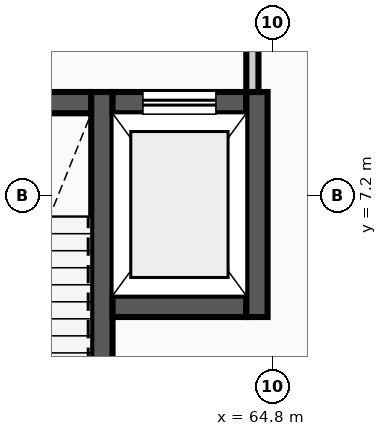
"""IFC4 building model, lengths in metres.
Left out: names, types, materials, properties, quantities, classifications, styles, units other than length and angle.
Written with IfcOpenShell. Run it as: python <this file> out.ifc"""

import sys

from ifc_helpers import new_model, si_unit, direction, frame, frame_2d, origin, place, context, subcontext, project, spatial, rectangle, extrude, element, fill, save


model = new_model("IFC4")
c1 = context("Model", 3, precision=1e-05, world=origin(), true_north=direction((0.0, 1.0)))
c2 = subcontext(c1, "Body", "Model", "MODEL_VIEW")
j1 = project(units=[si_unit("LENGTHUNIT", "METRE"), si_unit("PLANEANGLEUNIT", "RADIAN")], contexts=[c1])
p1 = place(None, origin())
s1 = spatial("IfcSite", under=j1, at=p1, CompositionType="ELEMENT")
p2 = place(p1, origin())
s2 = spatial("IfcBuilding", under=s1, at=p2, CompositionType="ELEMENT")
p3 = place(p2, frame((0.0, 0.0, 5.2)))
s3 = spatial("IfcBuildingStorey", under=s2, at=p3, CompositionType="ELEMENT", Elevation=5.2)
p4 = place(p3, frame((58.67, 8.725, 0.0), z_axis=(0.0, 0.0, 1.0), x_axis=(1.0, 0.0, 0.0)))
e1 = element("IfcWall", 1, at=p4, inside=s3, PredefinedType="SHEAR", context=c2, shape_type="SweptSolid", body=[
    extrude(rectangle(XDim=3.15, YDim=0.35, at=frame_2d((1.575, 0.0))), origin(), (0.0, 0.0, 1.0), 4.185),
])
p5 = place(p4, frame((1.025, 0.0, 0.0)))
e2 = element("IfcOpeningElement", 2, at=p5, cuts=e1, PredefinedType="OPENING", context=c2, shape_type="SweptSolid", body=[
    extrude(rectangle(XDim=1.1, YDim=2.15, at=frame_2d((0.55, 1.075))), frame((0.0, 0.185, 0.0), z_axis=(0.0, -1.0, 0.0), x_axis=(1.0, 0.0, 0.0)), (0.0, 0.0, 1.0), 0.37),
])
p6 = place(p3, frame((61.995, 0.4, 0.0), z_axis=(0.0, 0.0, 1.0), x_axis=(0.0, 1.0, 0.0)))
e3 = element("IfcWall", 3, at=p6, inside=s3, PredefinedType="SHEAR", context=c2, shape_type="SweptSolid", body=[
    extrude(rectangle(XDim=8.5, YDim=0.35, at=frame_2d((4.25, 0.0))), origin(), (0.0, 0.0, 1.0), 4.185),
])
p7 = place(p3, frame((62.17, 5.375, 0.0), z_axis=(0.0, 0.0, 1.0), x_axis=(1.0, 0.0, 0.0)))
e4 = element("IfcWall", 4, at=p7, inside=s3, PredefinedType="SHEAR", context=c2, shape_type="SweptSolid", body=[
    extrude(rectangle(XDim=2.2, YDim=0.35, at=frame_2d((1.1, 0.0))), origin(), (0.0, 0.0, 1.0), 4.185),
])
p8 = place(p3, frame((62.17, 8.725, 0.0), z_axis=(0.0, 0.0, 1.0), x_axis=(1.0, 0.0, 0.0)))
e5 = element("IfcWall", 5, at=p8, inside=s3, PredefinedType="SHEAR", context=c2, shape_type="SweptSolid", body=[
    extrude(rectangle(XDim=2.2, YDim=0.35, at=frame_2d((1.1, 0.0))), origin(), (0.0, 0.0, 1.0), 4.185),
])
p9 = place(p8, frame((0.5, 0.0, 0.0)))
e6 = element("IfcOpeningElement", 6, at=p9, cuts=e5, PredefinedType="OPENING", context=c2, shape_type="SweptSolid", body=[
    extrude(rectangle(XDim=1.2, YDim=2.2, at=frame_2d((0.6, 1.1))), frame((0.0, 0.185, 0.0), z_axis=(0.0, -1.0, 0.0), x_axis=(1.0, 0.0, 0.0)), (0.0, 0.0, 1.0), 0.37),
])
p10 = place(p3, frame((64.545, 5.2, 0.0), z_axis=(0.0, 0.0, 1.0), x_axis=(0.0, 1.0, 0.0)))
e7 = element("IfcWall", 7, at=p10, inside=s3, PredefinedType="SHEAR", context=c2, shape_type="SweptSolid", body=[
    extrude(rectangle(XDim=3.7, YDim=0.35, at=frame_2d((1.85, 0.0))), origin(), (0.0, 0.0, 1.0), 4.185),
])
p11 = place(p3, frame((64.47, 8.9, 0.0), z_axis=(0.0, 0.0, 1.0), x_axis=(0.0, 1.0, 0.0)))
e8 = element("IfcWall", 8, at=p11, inside=s3, PredefinedType="PARTITIONING", context=c2, shape_type="SweptSolid", body=[
    extrude(rectangle(XDim=2.45, YDim=0.2, at=frame_2d((1.225, 0.0))), origin(), (0.0, 0.0, 1.0), 4.185),
])
p12 = place(p9, origin())
e9 = element("IfcDoor", 9, at=p12, inside=s3, OperationType="SLIDING_TO_RIGHT", PredefinedType="DOOR", context=c2, shape_type="SweptSolid", body=[
    extrude(rectangle(XDim=1.2, YDim=2.2, at=frame_2d((0.6, 1.1))), frame((0.0, 0.025, 0.0), z_axis=(0.0, -1.0, 0.0), x_axis=(1.0, 0.0, 0.0)), (0.0, 0.0, 1.0), 0.05),
])
fill(e6, e9)
save(model, sys.argv[1])
